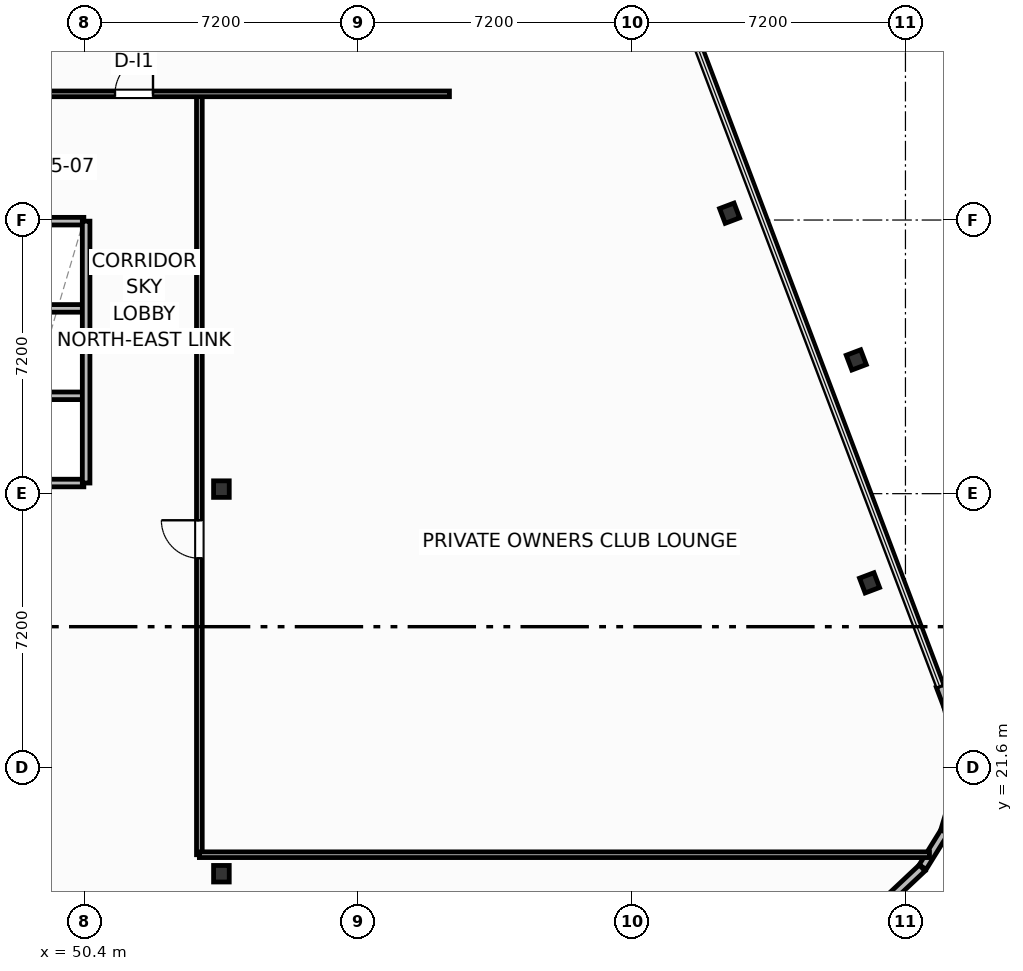
"""IFC4 building model, lengths in metres.
Left out: names, types, materials, properties, quantities, classifications, styles, units other than length and angle.
Written with IfcOpenShell. Run it as: python <this file> out.ifc"""

import sys

from ifc_helpers import new_model, si_unit, direction, frame, frame_2d, origin, origin_2d, place, context, subcontext, project, spatial, rectangle, i_section, extrude, element, fill, save


model = new_model("IFC4")
c1 = context("Model", 3, precision=1e-05, world=origin(), true_north=direction((0.0, 1.0)))
c2 = subcontext(c1, "Body", "Model", "MODEL_VIEW")
j1 = project(units=[si_unit("LENGTHUNIT", "METRE"), si_unit("PLANEANGLEUNIT", "RADIAN")], contexts=[c1])
p1 = place(None, origin())
s1 = spatial("IfcSite", under=j1, at=p1, CompositionType="ELEMENT")
p2 = place(p1, origin())
s2 = spatial("IfcBuilding", under=s1, at=p2, CompositionType="ELEMENT")
p3 = place(p2, frame((0.0, 0.0, 207.9)))
s3 = spatial("IfcBuildingStorey", under=s2, at=p3, CompositionType="ELEMENT", Elevation=207.9)
for number, where, z_axis, x_axis in (
    (1, (54.0, 18.8, 0.0), (0.0, 0.0, 1.0), (1.0, 0.0, 0.0)),
    (2, (54.0, 28.92, 0.0), (0.0, 0.0, 1.0), (1.0, 0.0, 0.0)),
):
    element("IfcColumn", number, at=place(p3, frame(where, z_axis=z_axis, x_axis=x_axis)), inside=s3, PredefinedType="COLUMN", context=c2, shape_type="SweptSolid", body=[
        extrude(i_section(OverallWidth=0.412, OverallDepth=0.435, WebThickness=0.036, FlangeThickness=0.057, FilletRadius=0.025, at=origin_2d()), origin(), (0.0, 0.0, 1.0), 4.8),
    ])
for number, where, z_axis, x_axis in (
    (3, (71.055, 26.453, -0.32), (0.0, 0.0, 1.0), (0.935, 0.354, 0.0)),
    (4, (70.706, 32.32, -0.32), (0.0, 0.0, 1.0), (0.935, 0.354, 0.0)),
    (5, (67.373, 36.18, -0.32), (0.0, 0.0, 1.0), (0.935, 0.354, 0.0)),
):
    element("IfcColumn", number, at=place(p3, frame(where, z_axis=z_axis, x_axis=x_axis)), inside=s3, PredefinedType="COLUMN", context=c2, shape_type="SweptSolid", body=[
        extrude(i_section(OverallWidth=0.406, OverallDepth=0.416, WebThickness=0.03, FlangeThickness=0.048, FilletRadius=0.025, at=origin_2d()), origin(), (0.0, 0.0, 1.0), 5.12),
    ])
p4 = place(p3, frame((8.315, 33.164, 0.0), z_axis=(0.0, 0.0, 1.0), x_axis=(0.935222646765, 0.354060165759, 0.0)))
e6 = element("IfcWall", 6, at=p4, inside=s3, PredefinedType="SOLIDWALL", context=c2, shape_type="SweptSolid", body=[
    extrude(rectangle(XDim=52.2, YDim=0.22, at=frame_2d((26.1, 0.0))), origin(), (0.0, 0.0, 1.0), 3.83),
])
p5 = place(p4, frame((23.64, 0.0, 0.0)))
e7 = element("IfcOpeningElement", 7, at=p5, cuts=e6, PredefinedType="OPENING", context=c2, shape_type="SweptSolid", body=[
    extrude(rectangle(XDim=1.85, YDim=2.3, at=frame_2d((0.925, 1.15))), frame((0.0, 0.12, 0.0), z_axis=(0.0, -1.0, 0.0), x_axis=(1.0, 0.0, 0.0)), (0.0, 0.0, 1.0), 0.24),
])
p6 = place(p4, frame((0.55, 0.0, 0.75)))
e8 = element("IfcOpeningElement", 8, at=p6, cuts=e6, PredefinedType="OPENING", context=c2, shape_type="SweptSolid", body=[
    extrude(rectangle(XDim=1.85, YDim=1.75, at=frame_2d((0.925, 0.875))), frame((0.0, 0.12, 0.0), z_axis=(0.0, -1.0, 0.0), x_axis=(1.0, 0.0, 0.0)), (0.0, 0.0, 1.0), 0.24),
])
p7 = place(p4, frame((49.8, 0.0, 0.75)))
e9 = element("IfcOpeningElement", 9, at=p7, cuts=e6, PredefinedType="OPENING", context=c2, shape_type="SweptSolid", body=[
    extrude(rectangle(XDim=1.85, YDim=1.75, at=frame_2d((0.925, 0.875))), frame((0.0, 0.12, 0.0), z_axis=(0.0, -1.0, 0.0), x_axis=(1.0, 0.0, 0.0)), (0.0, 0.0, 1.0), 0.24),
])
for number, where, z_axis, x_axis in (
    (10, (71.645, 18.204, 0.0), (0.0, 0.0, 1.0), (0.729, 0.685, 0.0)),
    (11, (72.453, 18.973, 0.0), (0.0, 0.0, 1.0), (0.526, 0.85, 0.0)),
    (12, (73.035, 19.926, 0.0), (0.0, 0.0, 1.0), (0.288, 0.958, 0.0)),
):
    element("IfcWall", number, at=place(p3, frame(where, z_axis=z_axis, x_axis=x_axis)), inside=s3, PredefinedType="SOLIDWALL", context=c2, shape_type="SweptSolid", body=[
        extrude(rectangle(XDim=1.092, YDim=0.22, at=frame_2d((0.546, 0.0))), origin(), (0.0, 0.0, 1.0), 3.83),
    ])
p8 = place(p3, frame((73.118, 23.206, 0.0), z_axis=(0.0, 0.0, 1.0), x_axis=(-0.353902093829, 0.935282474969, 0.0)))
e13 = element("IfcWall", 13, at=p8, inside=s3, PredefinedType="SOLIDWALL", context=c2, shape_type="SweptSolid", body=[
    extrude(rectangle(XDim=0.577, YDim=0.22, at=frame_2d((0.289, 0.0))), origin(), (0.0, 0.0, 1.0), 3.83),
])
p9 = place(p3, frame((53.42, 19.3, 0.0), z_axis=(0.0, 0.0, 1.0), x_axis=(0.0, 1.0, 0.0)))
e14 = element("IfcWall", 14, at=p9, inside=s3, PredefinedType="PARTITIONING", context=c2, shape_type="SweptSolid", body=[
    extrude(rectangle(XDim=20.02, YDim=0.15, at=frame_2d((10.01, 0.0))), origin(), (0.0, 0.0, 1.0), 4.55),
])
p10 = place(p9, frame((7.8, 0.0, 0.0)))
e15 = element("IfcOpeningElement", 15, at=p10, cuts=e14, PredefinedType="OPENING", context=c2, shape_type="SweptSolid", body=[
    extrude(rectangle(XDim=1.0, YDim=2.05, at=frame_2d((0.5, 1.025))), frame((0.0, 0.085, 0.0), z_axis=(0.0, -1.0, 0.0), x_axis=(1.0, 0.0, 0.0)), (0.0, 0.0, 1.0), 0.17),
])
p11 = place(p3, frame((53.42, 19.3, 0.0), z_axis=(0.0, 0.0, 1.0), x_axis=(1.0, 0.0, 0.0)))
e16 = element("IfcWall", 16, at=p11, inside=s3, PredefinedType="PARTITIONING", context=c2, shape_type="SweptSolid", body=[
    extrude(rectangle(XDim=19.212, YDim=0.15, at=frame_2d((9.606, 0.0))), origin(), (0.0, 0.0, 1.0), 4.55),
])
p12 = place(p3, frame((20.0, 39.32, 0.0), z_axis=(0.0, 0.0, 1.0), x_axis=(1.0, 0.0, 0.0)))
e17 = element("IfcWall", 17, at=p12, inside=s3, PredefinedType="PARTITIONING", context=c2, shape_type="SweptSolid", body=[
    extrude(rectangle(XDim=40.0, YDim=0.15, at=frame_2d((20.0, 0.0))), origin(), (0.0, 0.0, 1.0), 4.55),
])
p13 = place(p12, frame((31.2, 0.0, 0.0)))
e18 = element("IfcOpeningElement", 18, at=p13, cuts=e17, PredefinedType="OPENING", context=c2, shape_type="SweptSolid", body=[
    extrude(rectangle(XDim=1.0, YDim=2.05, at=frame_2d((0.5, 1.025))), frame((0.0, 0.085, 0.0), z_axis=(0.0, -1.0, 0.0), x_axis=(1.0, 0.0, 0.0)), (0.0, 0.0, 1.0), 0.17),
])
for number, where, z_axis, x_axis in (
    (19, (48.32, 31.375, 0.0), (0.0, 0.0, 1.0), (1.0, 0.0, 0.0)),
    (20, (48.32, 33.675, 0.0), (0.0, 0.0, 1.0), (1.0, 0.0, 0.0)),
):
    element("IfcWall", number, at=place(p3, frame(where, z_axis=z_axis, x_axis=x_axis)), inside=s3, PredefinedType="PARTITIONING", context=c2, shape_type="SweptSolid", body=[
        extrude(rectangle(XDim=2.06, YDim=0.2, at=frame_2d((1.03, 0.0))), origin(), (0.0, 0.0, 1.0), 4.55),
    ])
p14 = place(p3, frame((48.32, 29.08, 0.0), z_axis=(0.0, 0.0, 1.0), x_axis=(1.0, 0.0, 0.0)))
e21 = element("IfcWall", 21, at=p14, inside=s3, PredefinedType="PARTITIONING", context=c2, shape_type="SweptSolid", body=[
    extrude(rectangle(XDim=2.06, YDim=0.2, at=frame_2d((1.03, 0.0))), origin(), (0.0, 0.0, 1.0), 3.762),
])
p15 = place(p3, frame((48.32, 35.97, 0.0), z_axis=(0.0, 0.0, 1.0), x_axis=(1.0, 0.0, 0.0)))
e22 = element("IfcWall", 22, at=p15, inside=s3, PredefinedType="PARTITIONING", context=c2, shape_type="SweptSolid", body=[
    extrude(rectangle(XDim=2.06, YDim=0.2, at=frame_2d((1.03, 0.0))), origin(), (0.0, 0.0, 1.0), 4.55),
])
p16 = place(p3, frame((50.44, 29.08, 0.0), z_axis=(0.0, 0.0, 1.0), x_axis=(0.0, 1.0, 0.0)))
e23 = element("IfcWall", 23, at=p16, inside=s3, PredefinedType="PARTITIONING", context=c2, shape_type="SweptSolid", body=[
    extrude(rectangle(XDim=6.89, YDim=0.2, at=frame_2d((3.445, 0.0))), origin(), (0.0, 0.0, 1.0), 4.55),
])
p17 = place(p10, origin())
e24 = element("IfcDoor", 24, at=p17, inside=s3, OperationType="SINGLE_SWING_RIGHT", PredefinedType="DOOR", context=c2, shape_type="SweptSolid", body=[
    extrude(rectangle(XDim=1.0, YDim=2.05, at=frame_2d((0.5, 1.025))), frame((0.0, 0.025, 0.0), z_axis=(0.0, -1.0, 0.0), x_axis=(1.0, 0.0, 0.0)), (0.0, 0.0, 1.0), 0.05),
])
fill(e15, e24)
p18 = place(p13, origin())
e25 = element("IfcDoor", 25, at=p18, inside=s3, OperationType="SINGLE_SWING_RIGHT", PredefinedType="DOOR", context=c2, shape_type="SweptSolid", body=[
    extrude(rectangle(XDim=1.0, YDim=2.05, at=frame_2d((0.5, 1.025))), frame((0.0, 0.025, 0.0), z_axis=(0.0, -1.0, 0.0), x_axis=(1.0, 0.0, 0.0)), (0.0, 0.0, 1.0), 0.05),
])
fill(e18, e25)
save(model, sys.argv[1])
